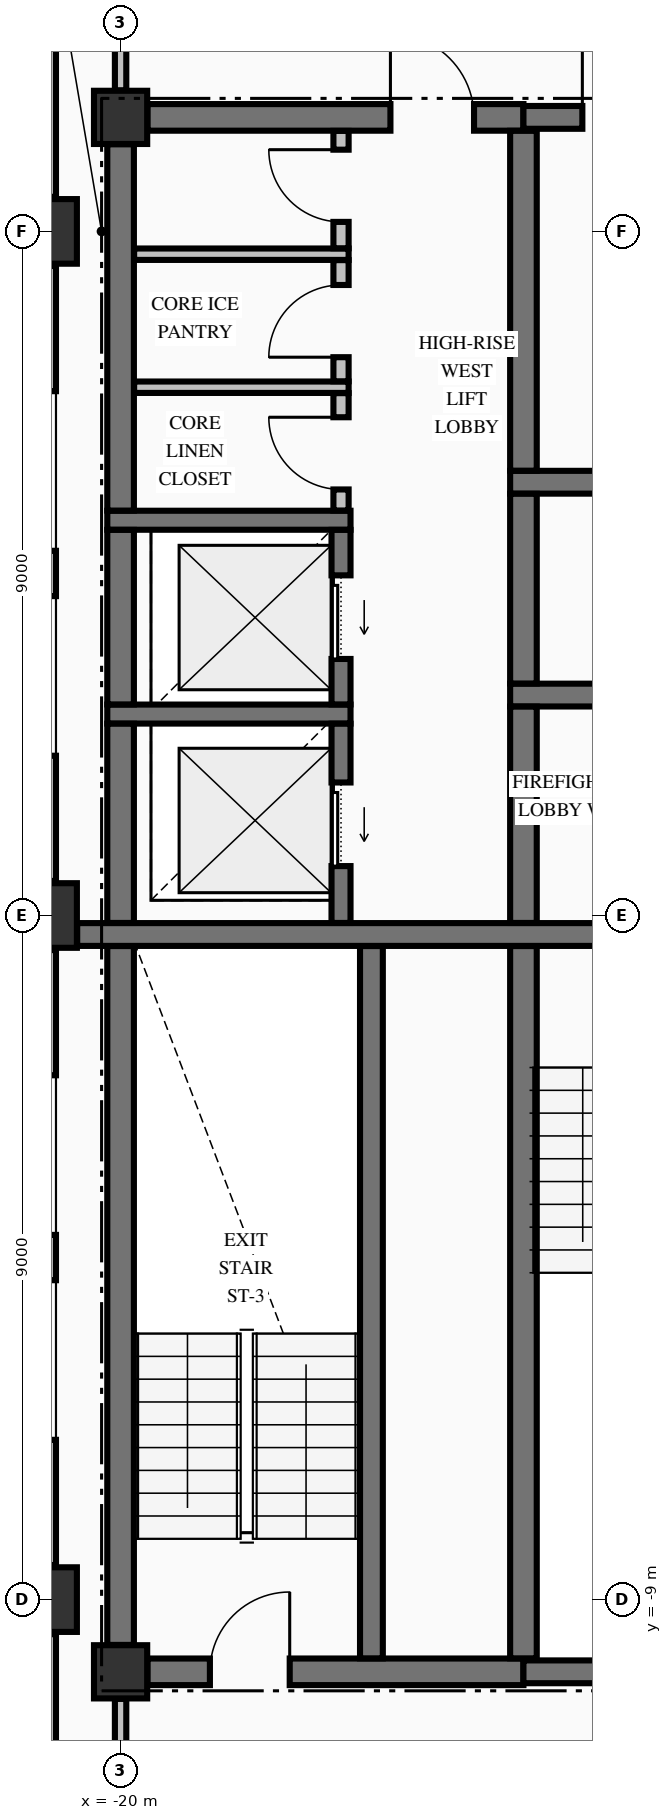
"""IFC4 building model, lengths in metres.
Left out: names, types, materials, properties, quantities, classifications, styles, units other than length and angle.
Written with IfcOpenShell. Run it as: python <this file> out.ifc"""

import sys

from ifc_helpers import new_model, si_unit, direction, frame, frame_2d, origin, origin_2d, place, context, subcontext, project, spatial, rectangle, extrude, element, fill, save


model = new_model("IFC4")
c1 = context("Model", 3, precision=1e-05, world=origin(), true_north=direction((0.0, 1.0)))
c2 = subcontext(c1, "Body", "Model", "MODEL_VIEW")
j1 = project(units=[si_unit("LENGTHUNIT", "METRE"), si_unit("PLANEANGLEUNIT", "RADIAN")], contexts=[c1])
p1 = place(None, origin())
s1 = spatial("IfcSite", under=j1, at=p1, CompositionType="ELEMENT")
p2 = place(p1, origin())
s2 = spatial("IfcBuilding", under=s1, at=p2, CompositionType="ELEMENT")
p3 = place(p2, frame((0.0, 0.0, 230.05)))
s3 = spatial("IfcBuildingStorey", under=s2, at=p3, CompositionType="ELEMENT", Elevation=230.05)
for number, where, z_axis, x_axis in (
    (1, (-21.0, -9.0, -0.25), (0.0, 0.0, 1.0), (1.0, 0.0, 0.0)),
    (2, (-21.0, 0.0, -0.25), (0.0, 0.0, 1.0), (1.0, 0.0, 0.0)),
    (3, (-21.0, 9.0, -0.25), (0.0, 0.0, 1.0), (1.0, 0.0, 0.0)),
):
    element("IfcColumn", number, at=place(p3, frame(where, z_axis=z_axis, x_axis=x_axis)), inside=s3, PredefinedType="COLUMN", context=c2, shape_type="SweptSolid", body=[
        extrude(rectangle(XDim=0.85, YDim=0.85, at=origin_2d()), origin(), (0.0, 0.0, 1.0), 3.23),
    ])
for number, where, z_axis, x_axis in (
    (4, (-20.0, -9.95, -0.25), (0.0, 0.0, 1.0), (1.0, 0.0, 0.0)),
    (5, (-20.0, 10.5, -0.25), (0.0, 0.0, 1.0), (1.0, 0.0, 0.0)),
):
    element("IfcColumn", number, at=place(p3, frame(where, z_axis=z_axis, x_axis=x_axis)), inside=s3, PredefinedType="COLUMN", context=c2, shape_type="SweptSolid", body=[
        extrude(rectangle(XDim=0.7, YDim=0.7, at=origin_2d()), origin(), (0.0, 0.0, 1.0), 3.23),
    ])
p4 = place(p3, frame((-21.0, -9.455, 0.0), z_axis=(0.0, 0.0, 1.0), x_axis=(0.0, -1.0, 0.0)))
e6 = element("IfcWall", 6, at=p4, inside=s3, PredefinedType="STANDARD", context=c2, shape_type="SweptSolid", body=[
    extrude(rectangle(XDim=8.09, YDim=0.3, at=frame_2d((4.045, 0.0))), origin(), (0.0, 0.0, 1.0), 2.372),
])
p5 = place(p3, frame((-21.0, -0.455, 0.0), z_axis=(0.0, 0.0, 1.0), x_axis=(0.0, -1.0, 0.0)))
e7 = element("IfcWall", 7, at=p5, inside=s3, PredefinedType="STANDARD", context=c2, shape_type="SweptSolid", body=[
    extrude(rectangle(XDim=8.09, YDim=0.3, at=frame_2d((4.045, 0.0))), origin(), (0.0, 0.0, 1.0), 2.372),
])
p6 = place(p5, frame((1.647, 0.0, 0.7)))
e8 = element("IfcOpeningElement", 8, at=p6, cuts=e7, PredefinedType="OPENING", context=c2, shape_type="SweptSolid", body=[
    extrude(rectangle(XDim=2.1, YDim=1.5, at=frame_2d((1.05, 0.75))), frame((0.0, 0.16, 0.0), z_axis=(0.0, -1.0, 0.0), x_axis=(1.0, 0.0, 0.0)), (0.0, 0.0, 1.0), 0.32),
])
p7 = place(p5, frame((4.343, 0.0, 0.7)))
e9 = element("IfcOpeningElement", 9, at=p7, cuts=e7, PredefinedType="OPENING", context=c2, shape_type="SweptSolid", body=[
    extrude(rectangle(XDim=2.1, YDim=1.5, at=frame_2d((1.05, 0.75))), frame((0.0, 0.16, 0.0), z_axis=(0.0, -1.0, 0.0), x_axis=(1.0, 0.0, 0.0)), (0.0, 0.0, 1.0), 0.32),
])
p8 = place(p3, frame((-21.0, 8.545, 0.0), z_axis=(0.0, 0.0, 1.0), x_axis=(0.0, -1.0, 0.0)))
e10 = element("IfcWall", 10, at=p8, inside=s3, PredefinedType="STANDARD", context=c2, shape_type="SweptSolid", body=[
    extrude(rectangle(XDim=8.09, YDim=0.3, at=frame_2d((4.045, 0.0))), origin(), (0.0, 0.0, 1.0), 2.372),
])
p9 = place(p8, frame((1.647, 0.0, 0.7)))
e11 = element("IfcOpeningElement", 11, at=p9, cuts=e10, PredefinedType="OPENING", context=c2, shape_type="SweptSolid", body=[
    extrude(rectangle(XDim=2.1, YDim=1.5, at=frame_2d((1.05, 0.75))), frame((0.0, 0.16, 0.0), z_axis=(0.0, -1.0, 0.0), x_axis=(1.0, 0.0, 0.0)), (0.0, 0.0, 1.0), 0.32),
])
p10 = place(p8, frame((4.343, 0.0, 0.7)))
e12 = element("IfcOpeningElement", 12, at=p10, cuts=e10, PredefinedType="OPENING", context=c2, shape_type="SweptSolid", body=[
    extrude(rectangle(XDim=2.1, YDim=1.5, at=frame_2d((1.05, 0.75))), frame((0.0, 0.16, 0.0), z_axis=(0.0, -1.0, 0.0), x_axis=(1.0, 0.0, 0.0)), (0.0, 0.0, 1.0), 0.32),
])
p11 = place(p3, frame((-21.0, 17.545, 0.0), z_axis=(0.0, 0.0, 1.0), x_axis=(0.0, -1.0, 0.0)))
e13 = element("IfcWall", 13, at=p11, inside=s3, PredefinedType="STANDARD", context=c2, shape_type="SweptSolid", body=[
    extrude(rectangle(XDim=8.09, YDim=0.3, at=frame_2d((4.045, 0.0))), origin(), (0.0, 0.0, 1.0), 2.372),
])
p12 = place(p3, frame((-19.646, -9.95, 0.0), z_axis=(0.0, 0.0, 1.0), x_axis=(1.0, 0.0, 0.0)))
e14 = element("IfcWall", 14, at=p12, inside=s3, PredefinedType="SHEAR", context=c2, shape_type="SweptSolid", body=[
    extrude(rectangle(XDim=4.946, YDim=0.35, at=frame_2d((2.473, 0.0))), origin(), (0.0, 0.0, 1.0), 2.98),
])
p13 = place(p12, frame((0.821, 0.0, 0.0)))
e15 = element("IfcOpeningElement", 15, at=p13, cuts=e14, PredefinedType="OPENING", context=c2, shape_type="SweptSolid", body=[
    extrude(rectangle(XDim=1.05, YDim=2.15, at=frame_2d((0.525, 1.075))), frame((0.0, 0.185, 0.0), z_axis=(0.0, -1.0, 0.0), x_axis=(1.0, 0.0, 0.0)), (0.0, 0.0, 1.0), 0.37),
])
p14 = place(p3, frame((-14.7, -9.95, 0.0), z_axis=(0.0, 0.0, 1.0), x_axis=(1.0, 0.0, 0.0)))
e16 = element("IfcWall", 16, at=p14, inside=s3, PredefinedType="SHEAR", context=c2, shape_type="SweptSolid", body=[
    extrude(rectangle(XDim=3.346, YDim=0.3, at=frame_2d((1.673, 0.0))), origin(), (0.0, 0.0, 1.0), 2.98),
])
p15 = place(p3, frame((-20.571, -0.25, 0.0), z_axis=(0.0, 0.0, 1.0), x_axis=(1.0, 0.0, 0.0)))
e17 = element("IfcWall", 17, at=p15, inside=s3, PredefinedType="SHEAR", context=c2, shape_type="SweptSolid", body=[
    extrude(rectangle(XDim=9.217, YDim=0.3, at=frame_2d((4.608, 0.0))), origin(), (0.0, 0.0, 1.0), 2.98),
])
p16 = place(p15, frame((6.871, 0.0, 0.0)))
e18 = element("IfcOpeningElement", 18, at=p16, cuts=e17, PredefinedType="OPENING", context=c2, shape_type="SweptSolid", body=[
    extrude(rectangle(XDim=1.1, YDim=2.15, at=frame_2d((0.55, 1.075))), frame((0.0, 0.16, 0.0), z_axis=(0.0, -1.0, 0.0), x_axis=(1.0, 0.0, 0.0)), (0.0, 0.0, 1.0), 0.32),
])
p17 = place(p3, frame((-20.175, 2.65, 0.0), z_axis=(0.0, 0.0, 1.0), x_axis=(1.0, 0.0, 0.0)))
e19 = element("IfcWall", 19, at=p17, inside=s3, PredefinedType="SOLIDWALL", context=c2, shape_type="SweptSolid", body=[
    extrude(rectangle(XDim=3.2, YDim=0.25, at=frame_2d((1.6, 0.0))), origin(), (0.0, 0.0, 1.0), 2.98),
])
p18 = place(p3, frame((-14.875, 2.9, 0.0), z_axis=(0.0, 0.0, 1.0), x_axis=(1.0, 0.0, 0.0)))
e20 = element("IfcWall", 20, at=p18, inside=s3, PredefinedType="SHEAR", context=c2, shape_type="SweptSolid", body=[
    extrude(rectangle(XDim=4.025, YDim=0.3, at=frame_2d((2.012, 0.0))), origin(), (0.0, 0.0, 1.0), 2.98),
])
p19 = place(p18, frame((2.075, 0.0, 0.0)))
e21 = element("IfcOpeningElement", 21, at=p19, cuts=e20, PredefinedType="OPENING", context=c2, shape_type="SweptSolid", body=[
    extrude(rectangle(XDim=1.1, YDim=2.2, at=frame_2d((0.55, 1.1))), frame((0.0, 0.16, 0.0), z_axis=(0.0, -1.0, 0.0), x_axis=(1.0, 0.0, 0.0)), (0.0, 0.0, 1.0), 0.32),
])
p20 = place(p3, frame((-20.175, 5.2, 0.0), z_axis=(0.0, 0.0, 1.0), x_axis=(1.0, 0.0, 0.0)))
e22 = element("IfcWall", 22, at=p20, inside=s3, PredefinedType="SOLIDWALL", context=c2, shape_type="SweptSolid", body=[
    extrude(rectangle(XDim=3.2, YDim=0.25, at=frame_2d((1.6, 0.0))), origin(), (0.0, 0.0, 1.0), 2.98),
])
p21 = place(p3, frame((-14.875, 5.7, 0.0), z_axis=(0.0, 0.0, 1.0), x_axis=(1.0, 0.0, 0.0)))
e23 = element("IfcWall", 23, at=p21, inside=s3, PredefinedType="SHEAR", context=c2, shape_type="SweptSolid", body=[
    extrude(rectangle(XDim=4.025, YDim=0.3, at=frame_2d((2.012, 0.0))), origin(), (0.0, 0.0, 1.0), 2.98),
])
p22 = place(p3, frame((-19.646, 10.5, 0.0), z_axis=(0.0, 0.0, 1.0), x_axis=(1.0, 0.0, 0.0)))
e24 = element("IfcWall", 24, at=p22, inside=s3, PredefinedType="SHEAR", context=c2, shape_type="SweptSolid", body=[
    extrude(rectangle(XDim=4.946, YDim=0.35, at=frame_2d((2.473, 0.0))), origin(), (0.0, 0.0, 1.0), 2.98),
])
p23 = place(p22, frame((3.196, 0.0, 0.0)))
e25 = element("IfcOpeningElement", 25, at=p23, cuts=e24, PredefinedType="OPENING", context=c2, shape_type="SweptSolid", body=[
    extrude(rectangle(XDim=1.1, YDim=2.15, at=frame_2d((0.55, 1.075))), frame((0.0, 0.185, 0.0), z_axis=(0.0, -1.0, 0.0), x_axis=(1.0, 0.0, 0.0)), (0.0, 0.0, 1.0), 0.37),
])
p24 = place(p3, frame((-14.7, 10.5, 0.0), z_axis=(0.0, 0.0, 1.0), x_axis=(1.0, 0.0, 0.0)))
e26 = element("IfcWall", 26, at=p24, inside=s3, PredefinedType="SHEAR", context=c2, shape_type="SweptSolid", body=[
    extrude(rectangle(XDim=3.346, YDim=0.3, at=frame_2d((1.673, 0.0))), origin(), (0.0, 0.0, 1.0), 2.98),
])
p25 = place(p24, frame((0.775, 0.0, 0.0)))
e27 = element("IfcOpeningElement", 27, at=p25, cuts=e26, PredefinedType="OPENING", context=c2, shape_type="SweptSolid", body=[
    extrude(rectangle(XDim=0.95, YDim=2.15, at=frame_2d((0.475, 1.075))), frame((0.0, 0.16, 0.0), z_axis=(0.0, -1.0, 0.0), x_axis=(1.0, 0.0, 0.0)), (0.0, 0.0, 1.0), 0.32),
])
for number, where, z_axis, x_axis in (
    (28, (-19.822, 6.95, 0.0), (0.0, 0.0, 1.0), (1.0, 0.0, 0.0)),
    (29, (-19.822, 8.7, 0.0), (0.0, 0.0, 1.0), (1.0, 0.0, 0.0)),
):
    element("IfcWall", number, at=place(p3, frame(where, z_axis=z_axis, x_axis=x_axis)), inside=s3, PredefinedType="PARTITIONING", context=c2, shape_type="SweptSolid", body=[
        extrude(rectangle(XDim=2.822, YDim=0.15, at=frame_2d((1.411, 0.0))), origin(), (0.0, 0.0, 1.0), 2.98),
    ])
p26 = place(p3, frame((-20.0, -9.596, 0.0), z_axis=(0.0, 0.0, 1.0), x_axis=(0.0, 1.0, 0.0)))
e30 = element("IfcWall", 30, at=p26, inside=s3, PredefinedType="SHEAR", context=c2, shape_type="SweptSolid", body=[
    extrude(rectangle(XDim=9.194, YDim=0.35, at=frame_2d((4.597, 0.0))), origin(), (0.0, 0.0, 1.0), 2.98),
])
p27 = place(p3, frame((-20.0, -0.098, 0.0), z_axis=(0.0, 0.0, 1.0), x_axis=(0.0, 1.0, 0.0)))
e31 = element("IfcWall", 31, at=p27, inside=s3, PredefinedType="SHEAR", context=c2, shape_type="SweptSolid", body=[
    extrude(rectangle(XDim=2.621, YDim=0.35, at=frame_2d((1.311, 0.0))), origin(), (0.0, 0.0, 1.0), 2.98),
])
p28 = place(p3, frame((-20.0, 2.777, 0.0), z_axis=(0.0, 0.0, 1.0), x_axis=(0.0, 1.0, 0.0)))
e32 = element("IfcWall", 32, at=p28, inside=s3, PredefinedType="SHEAR", context=c2, shape_type="SweptSolid", body=[
    extrude(rectangle(XDim=2.296, YDim=0.35, at=frame_2d((1.148, 0.0))), origin(), (0.0, 0.0, 1.0), 2.98),
])
p29 = place(p3, frame((-20.0, 5.327, 0.0), z_axis=(0.0, 0.0, 1.0), x_axis=(0.0, 1.0, 0.0)))
e33 = element("IfcWall", 33, at=p29, inside=s3, PredefinedType="SHEAR", context=c2, shape_type="SweptSolid", body=[
    extrude(rectangle(XDim=4.819, YDim=0.35, at=frame_2d((2.41, 0.0))), origin(), (0.0, 0.0, 1.0), 2.98),
])
p30 = place(p3, frame((-17.1, -0.098, 0.0), z_axis=(0.0, 0.0, 1.0), x_axis=(0.0, 1.0, 0.0)))
e34 = element("IfcWall", 34, at=p30, inside=s3, PredefinedType="SOLIDWALL", context=c2, shape_type="SweptSolid", body=[
    extrude(rectangle(XDim=2.621, YDim=0.25, at=frame_2d((1.311, 0.0))), origin(), (0.0, 0.0, 1.0), 2.98),
])
p31 = place(p30, frame((0.748, 0.0, 0.0)))
e35 = element("IfcOpeningElement", 35, at=p31, cuts=e34, PredefinedType="OPENING", context=c2, shape_type="SweptSolid", body=[
    extrude(rectangle(XDim=1.1, YDim=2.2, at=frame_2d((0.55, 1.1))), frame((0.0, 0.135, 0.0), z_axis=(0.0, -1.0, 0.0), x_axis=(1.0, 0.0, 0.0)), (0.0, 0.0, 1.0), 0.27),
])
p32 = place(p3, frame((-17.1, 2.777, 0.0), z_axis=(0.0, 0.0, 1.0), x_axis=(0.0, 1.0, 0.0)))
e36 = element("IfcWall", 36, at=p32, inside=s3, PredefinedType="SOLIDWALL", context=c2, shape_type="SweptSolid", body=[
    extrude(rectangle(XDim=2.296, YDim=0.25, at=frame_2d((1.148, 0.0))), origin(), (0.0, 0.0, 1.0), 2.98),
])
p33 = place(p32, frame((0.598, 0.0, 0.0)))
e37 = element("IfcOpeningElement", 37, at=p33, cuts=e36, PredefinedType="OPENING", context=c2, shape_type="SweptSolid", body=[
    extrude(rectangle(XDim=1.1, YDim=2.2, at=frame_2d((0.55, 1.1))), frame((0.0, 0.135, 0.0), z_axis=(0.0, -1.0, 0.0), x_axis=(1.0, 0.0, 0.0)), (0.0, 0.0, 1.0), 0.27),
])
p34 = place(p3, frame((-16.7, -9.773, 0.0), z_axis=(0.0, 0.0, 1.0), x_axis=(0.0, 1.0, 0.0)))
e38 = element("IfcWall", 38, at=p34, inside=s3, PredefinedType="SHEAR", context=c2, shape_type="SweptSolid", body=[
    extrude(rectangle(XDim=9.371, YDim=0.3, at=frame_2d((4.686, 0.0))), origin(), (0.0, 0.0, 1.0), 2.98),
])
p35 = place(p3, frame((-14.7, -9.773, 0.0), z_axis=(0.0, 0.0, 1.0), x_axis=(0.0, 1.0, 0.0)))
e39 = element("IfcWall", 39, at=p35, inside=s3, PredefinedType="SHEAR", context=c2, shape_type="SweptSolid", body=[
    extrude(rectangle(XDim=9.371, YDim=0.35, at=frame_2d((4.686, 0.0))), origin(), (0.0, 0.0, 1.0), 2.98),
])
p36 = place(p3, frame((-14.7, -0.098, 0.0), z_axis=(0.0, 0.0, 1.0), x_axis=(0.0, 1.0, 0.0)))
e40 = element("IfcWall", 40, at=p36, inside=s3, PredefinedType="SHEAR", context=c2, shape_type="SweptSolid", body=[
    extrude(rectangle(XDim=2.846, YDim=0.35, at=frame_2d((1.423, 0.0))), origin(), (0.0, 0.0, 1.0), 2.98),
])
p37 = place(p3, frame((-14.7, 3.052, 0.0), z_axis=(0.0, 0.0, 1.0), x_axis=(0.0, 1.0, 0.0)))
e41 = element("IfcWall", 41, at=p37, inside=s3, PredefinedType="SHEAR", context=c2, shape_type="SweptSolid", body=[
    extrude(rectangle(XDim=2.496, YDim=0.35, at=frame_2d((1.248, 0.0))), origin(), (0.0, 0.0, 1.0), 2.98),
])
p38 = place(p3, frame((-14.7, 5.852, 0.0), z_axis=(0.0, 0.0, 1.0), x_axis=(0.0, 1.0, 0.0)))
e42 = element("IfcWall", 42, at=p38, inside=s3, PredefinedType="SHEAR", context=c2, shape_type="SweptSolid", body=[
    extrude(rectangle(XDim=4.471, YDim=0.35, at=frame_2d((2.235, 0.0))), origin(), (0.0, 0.0, 1.0), 2.98),
])
p39 = place(p3, frame((-20.0, -12.122, 0.0), z_axis=(0.0, 0.0, 1.0), x_axis=(0.0, 1.0, 0.0)))
e43 = element("IfcWall", 43, at=p39, inside=s3, PredefinedType="PARTITIONING", context=c2, shape_type="SweptSolid", body=[
    extrude(rectangle(XDim=1.816, YDim=0.15, at=frame_2d((0.908, 0.0))), origin(), (0.0, 0.0, 1.0), 2.57),
])
p40 = place(p3, frame((-20.0, 10.856, 0.0), z_axis=(0.0, 0.0, 1.0), x_axis=(0.0, 1.0, 0.0)))
e44 = element("IfcWall", 44, at=p40, inside=s3, PredefinedType="PARTITIONING", context=c2, shape_type="SweptSolid", body=[
    extrude(rectangle(XDim=2.416, YDim=0.15, at=frame_2d((1.208, 0.0))), origin(), (0.0, 0.0, 1.0), 2.57),
])
p41 = place(p3, frame((-17.1, 5.328, 0.0), z_axis=(0.0, 0.0, 1.0), x_axis=(0.0, 1.0, 0.0)))
e45 = element("IfcWall", 45, at=p41, inside=s3, PredefinedType="PARTITIONING", context=c2, shape_type="SweptSolid", body=[
    extrude(rectangle(XDim=1.544, YDim=0.2, at=frame_2d((0.772, 0.0))), origin(), (0.0, 0.0, 1.0), 2.98),
])
p42 = place(p41, frame((0.277, 0.0, 0.0)))
e46 = element("IfcOpeningElement", 46, at=p42, cuts=e45, PredefinedType="OPENING", context=c2, shape_type="SweptSolid", body=[
    extrude(rectangle(XDim=0.95, YDim=2.15, at=frame_2d((0.475, 1.075))), frame((0.0, 0.11, 0.0), z_axis=(0.0, -1.0, 0.0), x_axis=(1.0, 0.0, 0.0)), (0.0, 0.0, 1.0), 0.22),
])
p43 = place(p3, frame((-17.1, 7.028, 0.0), z_axis=(0.0, 0.0, 1.0), x_axis=(0.0, 1.0, 0.0)))
e47 = element("IfcWall", 47, at=p43, inside=s3, PredefinedType="PARTITIONING", context=c2, shape_type="SweptSolid", body=[
    extrude(rectangle(XDim=1.594, YDim=0.2, at=frame_2d((0.797, 0.0))), origin(), (0.0, 0.0, 1.0), 2.98),
])
p44 = place(p43, frame((0.317, 0.0, 0.0)))
e48 = element("IfcOpeningElement", 48, at=p44, cuts=e47, PredefinedType="OPENING", context=c2, shape_type="SweptSolid", body=[
    extrude(rectangle(XDim=0.95, YDim=2.15, at=frame_2d((0.475, 1.075))), frame((0.0, 0.11, 0.0), z_axis=(0.0, -1.0, 0.0), x_axis=(1.0, 0.0, 0.0)), (0.0, 0.0, 1.0), 0.22),
])
p45 = place(p3, frame((-17.1, 8.778, 0.0), z_axis=(0.0, 0.0, 1.0), x_axis=(0.0, 1.0, 0.0)))
e49 = element("IfcWall", 49, at=p45, inside=s3, PredefinedType="PARTITIONING", context=c2, shape_type="SweptSolid", body=[
    extrude(rectangle(XDim=1.544, YDim=0.2, at=frame_2d((0.772, 0.0))), origin(), (0.0, 0.0, 1.0), 2.98),
])
p46 = place(p45, frame((0.347, 0.0, 0.0)))
e50 = element("IfcOpeningElement", 50, at=p46, cuts=e49, PredefinedType="OPENING", context=c2, shape_type="SweptSolid", body=[
    extrude(rectangle(XDim=0.95, YDim=2.15, at=frame_2d((0.475, 1.075))), frame((0.0, 0.11, 0.0), z_axis=(0.0, -1.0, 0.0), x_axis=(1.0, 0.0, 0.0)), (0.0, 0.0, 1.0), 0.22),
])
p47 = place(p25, origin())
e51 = element("IfcDoor", 51, at=p47, inside=s3, OperationType="SINGLE_SWING_LEFT", PredefinedType="DOOR", context=c2, shape_type="SweptSolid", body=[
    extrude(rectangle(XDim=0.95, YDim=2.15, at=frame_2d((0.475, 1.075))), frame((0.0, 0.025, 0.0), z_axis=(0.0, -1.0, 0.0), x_axis=(1.0, 0.0, 0.0)), (0.0, 0.0, 1.0), 0.05),
])
fill(e27, e51)
p48 = place(p13, origin())
e52 = element("IfcDoor", 52, at=p48, inside=s3, OperationType="SINGLE_SWING_RIGHT", PredefinedType="DOOR", context=c2, shape_type="SweptSolid", body=[
    extrude(rectangle(XDim=1.05, YDim=2.15, at=frame_2d((0.525, 1.075))), frame((0.0, 0.025, 0.0), z_axis=(0.0, -1.0, 0.0), x_axis=(1.0, 0.0, 0.0)), (0.0, 0.0, 1.0), 0.05),
])
fill(e15, e52)
p49 = place(p31, origin())
e53 = element("IfcDoor", 53, at=p49, inside=s3, OperationType="SLIDING_TO_LEFT", PredefinedType="DOOR", context=c2, shape_type="SweptSolid", body=[
    extrude(rectangle(XDim=1.1, YDim=2.2, at=frame_2d((0.55, 1.1))), frame((0.0, 0.025, 0.0), z_axis=(0.0, -1.0, 0.0), x_axis=(1.0, 0.0, 0.0)), (0.0, 0.0, 1.0), 0.05),
])
fill(e35, e53)
p50 = place(p33, origin())
e54 = element("IfcDoor", 54, at=p50, inside=s3, OperationType="SLIDING_TO_LEFT", PredefinedType="DOOR", context=c2, shape_type="SweptSolid", body=[
    extrude(rectangle(XDim=1.1, YDim=2.2, at=frame_2d((0.55, 1.1))), frame((0.0, 0.025, 0.0), z_axis=(0.0, -1.0, 0.0), x_axis=(1.0, 0.0, 0.0)), (0.0, 0.0, 1.0), 0.05),
])
fill(e37, e54)
p51 = place(p23, origin())
e55 = element("IfcDoor", 55, at=p51, inside=s3, OperationType="SINGLE_SWING_LEFT", PredefinedType="DOOR", context=c2, shape_type="SweptSolid", body=[
    extrude(rectangle(XDim=1.1, YDim=2.15, at=frame_2d((0.55, 1.075))), frame((0.0, 0.025, 0.0), z_axis=(0.0, -1.0, 0.0), x_axis=(1.0, 0.0, 0.0)), (0.0, 0.0, 1.0), 0.05),
])
fill(e25, e55)
p52 = place(p46, origin())
e56 = element("IfcDoor", 56, at=p52, inside=s3, OperationType="SINGLE_SWING_RIGHT", PredefinedType="DOOR", context=c2, shape_type="SweptSolid", body=[
    extrude(rectangle(XDim=0.95, YDim=2.15, at=frame_2d((0.475, 1.075))), frame((0.0, 0.025, 0.0), z_axis=(0.0, -1.0, 0.0), x_axis=(1.0, 0.0, 0.0)), (0.0, 0.0, 1.0), 0.05),
])
fill(e50, e56)
p53 = place(p44, origin())
e57 = element("IfcDoor", 57, at=p53, inside=s3, OperationType="SINGLE_SWING_LEFT", PredefinedType="DOOR", context=c2, shape_type="SweptSolid", body=[
    extrude(rectangle(XDim=0.95, YDim=2.15, at=frame_2d((0.475, 1.075))), frame((0.0, 0.025, 0.0), z_axis=(0.0, -1.0, 0.0), x_axis=(1.0, 0.0, 0.0)), (0.0, 0.0, 1.0), 0.05),
])
fill(e48, e57)
p54 = place(p42, origin())
e58 = element("IfcDoor", 58, at=p54, inside=s3, OperationType="SINGLE_SWING_RIGHT", PredefinedType="DOOR", context=c2, shape_type="SweptSolid", body=[
    extrude(rectangle(XDim=0.95, YDim=2.15, at=frame_2d((0.475, 1.075))), frame((0.0, 0.025, 0.0), z_axis=(0.0, -1.0, 0.0), x_axis=(1.0, 0.0, 0.0)), (0.0, 0.0, 1.0), 0.05),
])
fill(e46, e58)
save(model, sys.argv[1])
